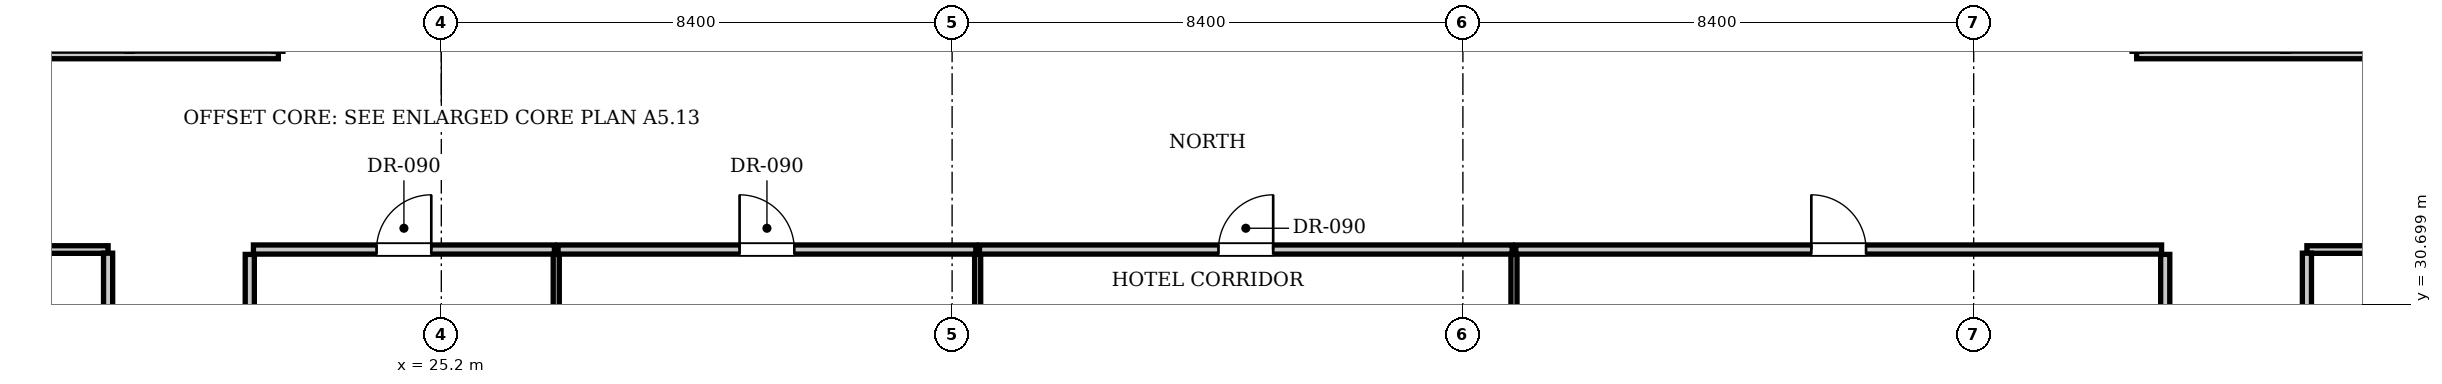
"""IFC4 building model, lengths in metres.
Left out: names, types, materials, properties, quantities, classifications, styles, units other than length and angle.
Written with IfcOpenShell. Run it as: python <this file> out.ifc"""

import sys

from ifc_helpers import new_model, si_unit, direction, frame, frame_2d, origin, place, context, subcontext, project, spatial, rectangle, extrude, element, fill, save


model = new_model("IFC4")
c1 = context("Model", 3, precision=1e-05, world=origin(), true_north=direction((0.0, 1.0)))
c2 = subcontext(c1, "Body", "Model", "MODEL_VIEW")
j1 = project(units=[si_unit("LENGTHUNIT", "METRE"), si_unit("PLANEANGLEUNIT", "RADIAN")], contexts=[c1])
p1 = place(None, origin())
s1 = spatial("IfcSite", under=j1, at=p1, CompositionType="ELEMENT")
p2 = place(p1, origin())
s2 = spatial("IfcBuilding", under=s1, at=p2, CompositionType="ELEMENT")
p3 = place(p2, frame((0.0, 0.0, 84.7)))
s3 = spatial("IfcBuildingStorey", under=s2, at=p3, CompositionType="ELEMENT", Elevation=84.7)
for number, where, z_axis, x_axis in (
    (1, (22.05, 23.68, 0.0), (0.0, 0.0, 1.0), (0.0, 1.0, 0.0)),
    (2, (53.55, 23.68, 0.0), (0.0, 0.0, 1.0), (0.0, 1.0, 0.0)),
):
    element("IfcWall", number, at=place(p3, frame(where, z_axis=z_axis, x_axis=x_axis)), inside=s3, PredefinedType="PARTITIONING", context=c2, shape_type="SweptSolid", body=[
        extrude(rectangle(XDim=7.84, YDim=0.15, at=frame_2d((3.92, 0.0))), origin(), (0.0, 0.0, 1.0), 3.61),
    ])
p4 = place(p3, frame((22.11, 31.6, 0.0), z_axis=(0.0, 0.0, 1.0), x_axis=(1.0, 0.0, 0.0)))
e3 = element("IfcWall", 3, at=p4, inside=s3, PredefinedType="PARTITIONING", context=c2, shape_type="SweptSolid", body=[
    extrude(rectangle(XDim=4.95, YDim=0.15, at=frame_2d((2.475, 0.0))), origin(), (0.0, 0.0, 1.0), 3.61),
])
p5 = place(p4, frame((2.025, 0.0, 0.0)))
e4 = element("IfcOpeningElement", 4, at=p5, cuts=e3, PredefinedType="OPENING", context=c2, shape_type="SweptSolid", body=[
    extrude(rectangle(XDim=0.9, YDim=2.1, at=frame_2d((0.45, 1.05))), frame((0.0, 0.085, 0.0), z_axis=(0.0, -1.0, 0.0), x_axis=(1.0, 0.0, 0.0)), (0.0, 0.0, 1.0), 0.17),
])
p6 = place(p3, frame((27.09, 23.68, 0.0), z_axis=(0.0, 0.0, 1.0), x_axis=(0.0, 1.0, 0.0)))
e5 = element("IfcWall", 5, at=p6, inside=s3, PredefinedType="PARTITIONING", context=c2, shape_type="SweptSolid", body=[
    extrude(rectangle(XDim=7.84, YDim=0.1, at=frame_2d((3.92, 0.0))), origin(), (0.0, 0.0, 1.0), 3.61),
])
p7 = place(p3, frame((27.12, 31.6, 0.0), z_axis=(0.0, 0.0, 1.0), x_axis=(1.0, 0.0, 0.0)))
e6 = element("IfcWall", 6, at=p7, inside=s3, PredefinedType="PARTITIONING", context=c2, shape_type="SweptSolid", body=[
    extrude(rectangle(XDim=6.87, YDim=0.15, at=frame_2d((3.435, 0.0))), origin(), (0.0, 0.0, 1.0), 3.61),
])
p8 = place(p7, frame((2.985, 0.0, 0.0)))
e7 = element("IfcOpeningElement", 7, at=p8, cuts=e6, PredefinedType="OPENING", context=c2, shape_type="SweptSolid", body=[
    extrude(rectangle(XDim=0.9, YDim=2.1, at=frame_2d((0.45, 1.05))), frame((0.0, 0.085, 0.0), z_axis=(0.0, -1.0, 0.0), x_axis=(1.0, 0.0, 0.0)), (0.0, 0.0, 1.0), 0.17),
])
p9 = place(p3, frame((34.02, 23.68, 0.0), z_axis=(0.0, 0.0, 1.0), x_axis=(0.0, 1.0, 0.0)))
e8 = element("IfcWall", 8, at=p9, inside=s3, PredefinedType="PARTITIONING", context=c2, shape_type="SweptSolid", body=[
    extrude(rectangle(XDim=7.84, YDim=0.1, at=frame_2d((3.92, 0.0))), origin(), (0.0, 0.0, 1.0), 3.61),
])
p10 = place(p3, frame((34.05, 31.6, 0.0), z_axis=(0.0, 0.0, 1.0), x_axis=(1.0, 0.0, 0.0)))
e9 = element("IfcWall", 9, at=p10, inside=s3, PredefinedType="PARTITIONING", context=c2, shape_type="SweptSolid", body=[
    extrude(rectangle(XDim=8.76, YDim=0.15, at=frame_2d((4.38, 0.0))), origin(), (0.0, 0.0, 1.0), 3.61),
])
p11 = place(p10, frame((3.93, 0.0, 0.0)))
e10 = element("IfcOpeningElement", 10, at=p11, cuts=e9, PredefinedType="OPENING", context=c2, shape_type="SweptSolid", body=[
    extrude(rectangle(XDim=0.9, YDim=2.1, at=frame_2d((0.45, 1.05))), frame((0.0, 0.085, 0.0), z_axis=(0.0, -1.0, 0.0), x_axis=(1.0, 0.0, 0.0)), (0.0, 0.0, 1.0), 0.17),
])
p12 = place(p3, frame((42.84, 23.68, 0.0), z_axis=(0.0, 0.0, 1.0), x_axis=(0.0, 1.0, 0.0)))
e11 = element("IfcWall", 11, at=p12, inside=s3, PredefinedType="PARTITIONING", context=c2, shape_type="SweptSolid", body=[
    extrude(rectangle(XDim=7.84, YDim=0.1, at=frame_2d((3.92, 0.0))), origin(), (0.0, 0.0, 1.0), 3.61),
])
p13 = place(p3, frame((42.87, 31.6, 0.0), z_axis=(0.0, 0.0, 1.0), x_axis=(1.0, 0.0, 0.0)))
e12 = element("IfcWall", 12, at=p13, inside=s3, PredefinedType="PARTITIONING", context=c2, shape_type="SweptSolid", body=[
    extrude(rectangle(XDim=10.62, YDim=0.15, at=frame_2d((5.31, 0.0))), origin(), (0.0, 0.0, 1.0), 3.61),
])
p14 = place(p13, frame((4.86, 0.0, 0.0)))
e13 = element("IfcOpeningElement", 13, at=p14, cuts=e12, PredefinedType="OPENING", context=c2, shape_type="SweptSolid", body=[
    extrude(rectangle(XDim=0.9, YDim=2.1, at=frame_2d((0.45, 1.05))), frame((0.0, 0.085, 0.0), z_axis=(0.0, -1.0, 0.0), x_axis=(1.0, 0.0, 0.0)), (0.0, 0.0, 1.0), 0.17),
])
for number, where, z_axis, x_axis in (
    (14, (10.9, 31.6, 0.0), (0.0, 0.0, 1.0), (1.0, 0.0, 0.0)),
    (15, (55.88, 31.6, 0.0), (0.0, 0.0, 1.0), (1.0, 0.0, 0.0)),
):
    element("IfcWall", number, at=place(p3, frame(where, z_axis=z_axis, x_axis=x_axis)), inside=s3, PredefinedType="PARTITIONING", context=c2, shape_type="SweptSolid", body=[
        extrude(rectangle(XDim=8.82, YDim=0.125, at=frame_2d((4.41, 0.0))), origin(), (0.0, 0.0, 1.0), 3.61),
    ])
for number, where, z_axis, x_axis in (
    (16, (19.72, 29.65, 0.0), (0.0, 0.0, 1.0), (0.0, 1.0, 0.0)),
    (17, (55.88, 29.65, 0.0), (0.0, 0.0, 1.0), (0.0, 1.0, 0.0)),
):
    element("IfcWall", number, at=place(p3, frame(where, z_axis=z_axis, x_axis=x_axis)), inside=s3, PredefinedType="PARTITIONING", context=c2, shape_type="SweptSolid", body=[
        extrude(rectangle(XDim=1.89, YDim=0.15, at=frame_2d((0.945, 0.0))), origin(), (0.0, 0.0, 1.0), 3.61),
    ])
p15 = place(p3, frame((10.9, 34.8, 0.0), z_axis=(0.0, 0.0, 1.0), x_axis=(1.0, 0.0, 0.0)))
e18 = element("IfcWall", 18, at=p15, inside=s3, PredefinedType="PARTITIONING", context=c2, shape_type="SweptSolid", body=[
    extrude(rectangle(XDim=11.62, YDim=0.125, at=frame_2d((5.81, 0.0))), origin(), (0.0, 0.0, 1.0), 3.61),
])
p16 = place(p3, frame((53.08, 34.8, 0.0), z_axis=(0.0, 0.0, 1.0), x_axis=(1.0, 0.0, 0.0)))
e19 = element("IfcWall", 19, at=p16, inside=s3, PredefinedType="PARTITIONING", context=c2, shape_type="SweptSolid", body=[
    extrude(rectangle(XDim=11.62, YDim=0.125, at=frame_2d((5.81, 0.0))), origin(), (0.0, 0.0, 1.0), 3.61),
])
p17 = place(p5, origin())
e20 = element("IfcDoor", 20, at=p17, inside=s3, OperationType="SINGLE_SWING_RIGHT", PredefinedType="DOOR", context=c2, shape_type="SweptSolid", body=[
    extrude(rectangle(XDim=0.9, YDim=2.1, at=frame_2d((0.45, 1.05))), frame((0.0, 0.025, 0.0), z_axis=(0.0, -1.0, 0.0), x_axis=(1.0, 0.0, 0.0)), (0.0, 0.0, 1.0), 0.05),
])
fill(e4, e20)
p18 = place(p8, origin())
e21 = element("IfcDoor", 21, at=p18, inside=s3, OperationType="SINGLE_SWING_LEFT", PredefinedType="DOOR", context=c2, shape_type="SweptSolid", body=[
    extrude(rectangle(XDim=0.9, YDim=2.1, at=frame_2d((0.45, 1.05))), frame((0.0, 0.025, 0.0), z_axis=(0.0, -1.0, 0.0), x_axis=(1.0, 0.0, 0.0)), (0.0, 0.0, 1.0), 0.05),
])
fill(e7, e21)
p19 = place(p11, origin())
e22 = element("IfcDoor", 22, at=p19, inside=s3, OperationType="SINGLE_SWING_RIGHT", PredefinedType="DOOR", context=c2, shape_type="SweptSolid", body=[
    extrude(rectangle(XDim=0.9, YDim=2.1, at=frame_2d((0.45, 1.05))), frame((0.0, 0.025, 0.0), z_axis=(0.0, -1.0, 0.0), x_axis=(1.0, 0.0, 0.0)), (0.0, 0.0, 1.0), 0.05),
])
fill(e10, e22)
p20 = place(p14, origin())
e23 = element("IfcDoor", 23, at=p20, inside=s3, OperationType="SINGLE_SWING_LEFT", PredefinedType="DOOR", context=c2, shape_type="SweptSolid", body=[
    extrude(rectangle(XDim=0.9, YDim=2.1, at=frame_2d((0.45, 1.05))), frame((0.0, 0.025, 0.0), z_axis=(0.0, -1.0, 0.0), x_axis=(1.0, 0.0, 0.0)), (0.0, 0.0, 1.0), 0.05),
])
fill(e13, e23)
save(model, sys.argv[1])
